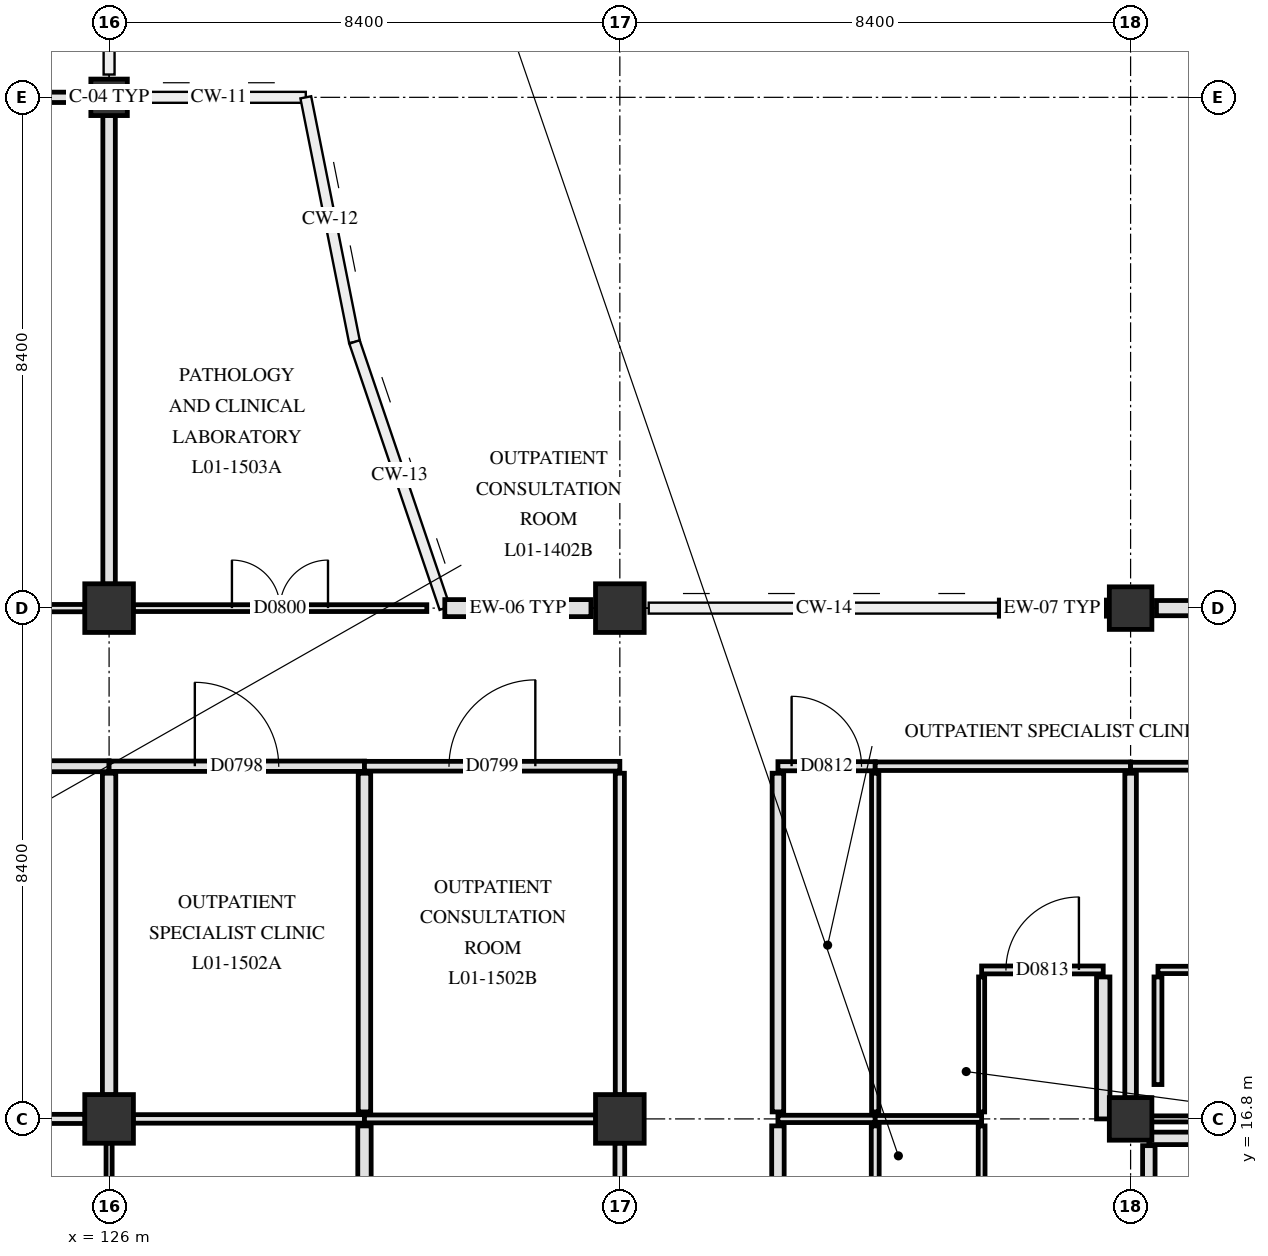
"""IFC4 building model, lengths in metres.
Left out: names, types, materials, properties, quantities, classifications, styles, units other than length and angle.
Written with IfcOpenShell. Run it as: python <this file> out.ifc"""

import sys

from ifc_helpers import new_model, si_unit, direction, frame, frame_2d, origin, origin_2d, place, context, subcontext, project, spatial, rectangle, extrude, element, fill, save


model = new_model("IFC4")
c1 = context("Model", 3, precision=1e-05, world=origin(), true_north=direction((0.0, 1.0)))
c2 = subcontext(c1, "Body", "Model", "MODEL_VIEW")
j1 = project(units=[si_unit("LENGTHUNIT", "METRE"), si_unit("PLANEANGLEUNIT", "RADIAN")], contexts=[c1])
p1 = place(None, origin())
s1 = spatial("IfcSite", under=j1, at=p1, CompositionType="ELEMENT")
p2 = place(p1, origin())
s2 = spatial("IfcBuilding", under=s1, at=p2, CompositionType="ELEMENT")
p3 = place(p2, frame((0.0, 0.0, 4.8)))
s3 = spatial("IfcBuildingStorey", under=s2, at=p3, CompositionType="ELEMENT", Elevation=4.8)
for number, where, z_axis, x_axis in (
    (1, (126.0, 16.8, 0.0), (0.0, 0.0, 1.0), (1.0, 0.0, 0.0)),
    (2, (126.0, 25.2, 0.0), (0.0, 0.0, 1.0), (1.0, 0.0, 0.0)),
):
    element("IfcColumn", number, at=place(p3, frame(where, z_axis=z_axis, x_axis=x_axis)), inside=s3, PredefinedType="COLUMN", context=c2, shape_type="SweptSolid", body=[
        extrude(rectangle(XDim=0.8, YDim=0.8, at=origin_2d()), origin(), (0.0, 0.0, 1.0), 4.5),
    ])
p4 = place(p3, frame((126.0, 33.6, 0.0), z_axis=(0.0, 0.0, 1.0), x_axis=(1.0, 0.0, 0.0)))
e3 = element("IfcColumn", 3, at=p4, inside=s3, PredefinedType="COLUMN", context=c2, shape_type="SweptSolid", body=[
    extrude(rectangle(XDim=0.6, YDim=0.6, at=origin_2d()), origin(), (0.0, 0.0, 1.0), 4.5),
])
for number, where, z_axis, x_axis in (
    (4, (134.4, 16.8, 0.0), (0.0, 0.0, 1.0), (1.0, 0.0, 0.0)),
    (5, (134.4, 25.2, 0.0), (0.0, 0.0, 1.0), (1.0, 0.0, 0.0)),
):
    element("IfcColumn", number, at=place(p3, frame(where, z_axis=z_axis, x_axis=x_axis)), inside=s3, PredefinedType="COLUMN", context=c2, shape_type="SweptSolid", body=[
        extrude(rectangle(XDim=0.8, YDim=0.8, at=origin_2d()), origin(), (0.0, 0.0, 1.0), 4.5),
    ])
for number, where, z_axis, x_axis in (
    (6, (142.8, 16.8, 0.0), (0.0, 0.0, 1.0), (1.0, 0.0, 0.0)),
    (7, (142.8, 25.2, 0.0), (0.0, 0.0, 1.0), (1.0, 0.0, 0.0)),
):
    element("IfcColumn", number, at=place(p3, frame(where, z_axis=z_axis, x_axis=x_axis)), inside=s3, PredefinedType="COLUMN", context=c2, shape_type="SweptSolid", body=[
        extrude(rectangle(XDim=0.7, YDim=0.7, at=origin_2d()), origin(), (0.0, 0.0, 1.0), 4.5),
    ])
p5 = place(p3, frame((131.521, 25.2, 0.0), z_axis=(0.0, 0.0, 1.0), x_axis=(1.0, 0.0, 0.0)))
e8 = element("IfcWall", 8, at=p5, inside=s3, PredefinedType="SOLIDWALL", context=c2, shape_type="SweptSolid", body=[
    extrude(rectangle(XDim=2.404, YDim=0.28, at=frame_2d((1.202, 0.0))), origin(), (0.0, 0.0, 1.0), 3.54),
])
p6 = place(p3, frame((140.641, 25.2, 0.0), z_axis=(0.0, 0.0, 1.0), x_axis=(1.0, 0.0, 0.0)))
e9 = element("IfcWall", 9, at=p6, inside=s3, PredefinedType="SOLIDWALL", context=c2, shape_type="SweptSolid", body=[
    extrude(rectangle(XDim=1.734, YDim=0.265, at=frame_2d((0.867, 0.0))), origin(), (0.0, 0.0, 1.0), 3.44),
])
p7 = place(p3, frame((143.225, 25.2, 0.0), z_axis=(0.0, 0.0, 1.0), x_axis=(1.0, 0.0, 0.0)))
e10 = element("IfcWall", 10, at=p7, inside=s3, PredefinedType="SOLIDWALL", context=c2, shape_type="SweptSolid", body=[
    extrude(rectangle(XDim=6.536, YDim=0.25, at=frame_2d((3.268, 0.0))), origin(), (0.0, 0.0, 1.0), 3.44),
])
p8 = place(p7, frame((0.934, 0.0, 0.85)))
e11 = element("IfcOpeningElement", 11, at=p8, cuts=e10, PredefinedType="OPENING", context=c2, shape_type="SweptSolid", body=[
    extrude(rectangle(XDim=1.4, YDim=1.66, at=frame_2d((0.7, 0.83))), frame((0.0, 0.135, 0.0), z_axis=(0.0, -1.0, 0.0), x_axis=(1.0, 0.0, 0.0)), (0.0, 0.0, 1.0), 0.27),
])
p9 = place(p7, frame((4.152, 0.0, 0.85)))
e12 = element("IfcOpeningElement", 12, at=p9, cuts=e10, PredefinedType="OPENING", context=c2, shape_type="SweptSolid", body=[
    extrude(rectangle(XDim=1.5, YDim=1.66, at=frame_2d((0.75, 0.83))), frame((0.0, 0.135, 0.0), z_axis=(0.0, -1.0, 0.0), x_axis=(1.0, 0.0, 0.0)), (0.0, 0.0, 1.0), 0.27),
])
p10 = place(p3, frame((143.1, 12.24, 0.0), z_axis=(0.0, 0.0, 1.0), x_axis=(0.0, 1.0, 0.0)))
e13 = element("IfcWall", 13, at=p10, inside=s3, PredefinedType="PARTITIONING", context=c2, shape_type="SweptSolid", body=[
    extrude(rectangle(XDim=4.12, YDim=0.205, at=frame_2d((2.06, 0.0))), origin(), (0.0, 0.0, 1.0), 3.59),
])
p11 = place(p3, frame((143.1, 16.48, 0.0), z_axis=(0.0, 0.0, 1.0), x_axis=(1.0, 0.0, 0.0)))
e14 = element("IfcWall", 14, at=p11, inside=s3, PredefinedType="PARTITIONING", context=c2, shape_type="SweptSolid", body=[
    extrude(rectangle(XDim=4.18, YDim=0.205, at=frame_2d((2.09, 0.0))), origin(), (0.0, 0.0, 1.0), 3.54),
])
p12 = place(p11, frame((1.29, 0.0, 0.0)))
e15 = element("IfcOpeningElement", 15, at=p12, cuts=e14, PredefinedType="OPENING", context=c2, shape_type="SweptSolid", body=[
    extrude(rectangle(XDim=1.6, YDim=2.25, at=frame_2d((0.8, 1.125))), frame((0.0, 0.113, 0.0), z_axis=(0.0, -1.0, 0.0), x_axis=(1.0, 0.0, 0.0)), (0.0, 0.0, 1.0), 0.225),
])
p13 = place(p3, frame((121.8, 16.8, 0.0), z_axis=(0.0, 0.0, 1.0), x_axis=(1.0, 0.0, 0.0)))
e16 = element("IfcWall", 16, at=p13, inside=s3, PredefinedType="PARTITIONING", context=c2, shape_type="SweptSolid", body=[
    extrude(rectangle(XDim=3.805, YDim=0.15, at=frame_2d((1.902, 0.0))), origin(), (0.0, 0.0, 1.0), 3.54),
])
p14 = place(p3, frame((126.395, 16.8, 0.0), z_axis=(0.0, 0.0, 1.0), x_axis=(1.0, 0.0, 0.0)))
e17 = element("IfcWall", 17, at=p14, inside=s3, PredefinedType="PARTITIONING", context=c2, shape_type="SweptSolid", body=[
    extrude(rectangle(XDim=3.805, YDim=0.14, at=frame_2d((1.902, 0.0))), origin(), (0.0, 0.0, 1.0), 3.54),
])
p15 = place(p3, frame((130.2, 16.8, 0.0), z_axis=(0.0, 0.0, 1.0), x_axis=(1.0, 0.0, 0.0)))
e18 = element("IfcWall", 18, at=p15, inside=s3, PredefinedType="PARTITIONING", context=c2, shape_type="SweptSolid", body=[
    extrude(rectangle(XDim=3.805, YDim=0.13, at=frame_2d((1.902, 0.0))), origin(), (0.0, 0.0, 1.0), 3.54),
])
p16 = place(p3, frame((137.0, 16.8, 0.0), z_axis=(0.0, 0.0, 1.0), x_axis=(1.0, 0.0, 0.0)))
e19 = element("IfcWall", 19, at=p16, inside=s3, PredefinedType="PARTITIONING", context=c2, shape_type="SweptSolid", body=[
    extrude(rectangle(XDim=1.6, YDim=0.12, at=frame_2d((0.8, 0.0))), origin(), (0.0, 0.0, 1.0), 3.54),
])
p17 = place(p3, frame((138.6, 16.8, 0.0), z_axis=(0.0, 0.0, 1.0), x_axis=(1.0, 0.0, 0.0)))
e20 = element("IfcWall", 20, at=p17, inside=s3, PredefinedType="PARTITIONING", context=c2, shape_type="SweptSolid", body=[
    extrude(rectangle(XDim=1.75, YDim=0.112, at=frame_2d((0.875, 0.0))), origin(), (0.0, 0.0, 1.0), 3.54),
])
p18 = place(p3, frame((143.145, 16.8, 0.0), z_axis=(0.0, 0.0, 1.0), x_axis=(1.0, 0.0, 0.0)))
e21 = element("IfcWall", 21, at=p18, inside=s3, PredefinedType="PARTITIONING", context=c2, shape_type="SweptSolid", body=[
    extrude(rectangle(XDim=1.085, YDim=0.1, at=frame_2d((0.542, 0.0))), origin(), (0.0, 0.0, 1.0), 3.54),
])
p19 = place(p3, frame((140.35, 19.25, 0.0), z_axis=(0.0, 0.0, 1.0), x_axis=(1.0, 0.0, 0.0)))
e22 = element("IfcWall", 22, at=p19, inside=s3, PredefinedType="PARTITIONING", context=c2, shape_type="SweptSolid", body=[
    extrude(rectangle(XDim=2.0, YDim=0.13, at=frame_2d((1.0, 0.0))), origin(), (0.0, 0.0, 1.0), 4.14),
])
p20 = place(p19, frame((0.4, 0.0, 0.0)))
e23 = element("IfcOpeningElement", 23, at=p20, cuts=e22, PredefinedType="OPENING", context=c2, shape_type="SweptSolid", body=[
    extrude(rectangle(XDim=1.2, YDim=2.15, at=frame_2d((0.6, 1.075))), frame((0.0, 0.075, 0.0), z_axis=(0.0, -1.0, 0.0), x_axis=(1.0, 0.0, 0.0)), (0.0, 0.0, 1.0), 0.15),
])
p21 = place(p3, frame((143.25, 19.25, 0.0), z_axis=(0.0, 0.0, 1.0), x_axis=(1.0, 0.0, 0.0)))
e24 = element("IfcWall", 24, at=p21, inside=s3, PredefinedType="PARTITIONING", context=c2, shape_type="SweptSolid", body=[
    extrude(rectangle(XDim=3.75, YDim=0.12, at=frame_2d((1.875, 0.0))), origin(), (0.0, 0.0, 1.0), 4.14),
])
p22 = place(p21, frame((1.365, 0.0, 0.0)))
e25 = element("IfcOpeningElement", 25, at=p22, cuts=e24, PredefinedType="OPENING", context=c2, shape_type="SweptSolid", body=[
    extrude(rectangle(XDim=1.02, YDim=2.12, at=frame_2d((0.51, 1.06))), frame((0.0, 0.07, 0.0), z_axis=(0.0, -1.0, 0.0), x_axis=(1.0, 0.0, 0.0)), (0.0, 0.0, 1.0), 0.14),
])
p23 = place(p3, frame((121.8, 22.6, 0.0), z_axis=(0.0, 0.0, 1.0), x_axis=(1.0, 0.0, 0.0)))
e26 = element("IfcWall", 26, at=p23, inside=s3, PredefinedType="PARTITIONING", context=c2, shape_type="SweptSolid", body=[
    extrude(rectangle(XDim=4.2, YDim=0.18, at=frame_2d((2.1, 0.0))), origin(), (0.0, 0.0, 1.0), 3.59),
])
p24 = place(p23, frame((1.45, 0.0, 0.0)))
e27 = element("IfcOpeningElement", 27, at=p24, cuts=e26, PredefinedType="OPENING", context=c2, shape_type="SweptSolid", body=[
    extrude(rectangle(XDim=1.3, YDim=2.2, at=frame_2d((0.65, 1.1))), frame((0.0, 0.1, 0.0), z_axis=(0.0, -1.0, 0.0), x_axis=(1.0, 0.0, 0.0)), (0.0, 0.0, 1.0), 0.2),
])
p25 = place(p3, frame((126.0, 22.6, 0.0), z_axis=(0.0, 0.0, 1.0), x_axis=(1.0, 0.0, 0.0)))
e28 = element("IfcWall", 28, at=p25, inside=s3, PredefinedType="PARTITIONING", context=c2, shape_type="SweptSolid", body=[
    extrude(rectangle(XDim=4.2, YDim=0.17, at=frame_2d((2.1, 0.0))), origin(), (0.0, 0.0, 1.0), 3.59),
])
p26 = place(p25, frame((1.41, 0.0, 0.0)))
e29 = element("IfcOpeningElement", 29, at=p26, cuts=e28, PredefinedType="OPENING", context=c2, shape_type="SweptSolid", body=[
    extrude(rectangle(XDim=1.38, YDim=2.22, at=frame_2d((0.69, 1.11))), frame((0.0, 0.095, 0.0), z_axis=(0.0, -1.0, 0.0), x_axis=(1.0, 0.0, 0.0)), (0.0, 0.0, 1.0), 0.19),
])
p27 = place(p3, frame((130.2, 22.6, 0.0), z_axis=(0.0, 0.0, 1.0), x_axis=(1.0, 0.0, 0.0)))
e30 = element("IfcWall", 30, at=p27, inside=s3, PredefinedType="PARTITIONING", context=c2, shape_type="SweptSolid", body=[
    extrude(rectangle(XDim=4.2, YDim=0.16, at=frame_2d((2.1, 0.0))), origin(), (0.0, 0.0, 1.0), 3.59),
])
p28 = place(p27, frame((1.39, 0.0, 0.0)))
e31 = element("IfcOpeningElement", 31, at=p28, cuts=e30, PredefinedType="OPENING", context=c2, shape_type="SweptSolid", body=[
    extrude(rectangle(XDim=1.42, YDim=2.22, at=frame_2d((0.71, 1.11))), frame((0.0, 0.09, 0.0), z_axis=(0.0, -1.0, 0.0), x_axis=(1.0, 0.0, 0.0)), (0.0, 0.0, 1.0), 0.18),
])
p29 = place(p3, frame((137.0, 22.6, 0.0), z_axis=(0.0, 0.0, 1.0), x_axis=(1.0, 0.0, 0.0)))
e32 = element("IfcWall", 32, at=p29, inside=s3, PredefinedType="PARTITIONING", context=c2, shape_type="SweptSolid", body=[
    extrude(rectangle(XDim=1.6, YDim=0.15, at=frame_2d((0.8, 0.0))), origin(), (0.0, 0.0, 1.0), 4.14),
])
p30 = place(p29, frame((0.225, 0.0, 0.0)))
e33 = element("IfcOpeningElement", 33, at=p30, cuts=e32, PredefinedType="OPENING", context=c2, shape_type="SweptSolid", body=[
    extrude(rectangle(XDim=1.15, YDim=2.15, at=frame_2d((0.575, 1.075))), frame((0.0, 0.085, 0.0), z_axis=(0.0, -1.0, 0.0), x_axis=(1.0, 0.0, 0.0)), (0.0, 0.0, 1.0), 0.17),
])
p31 = place(p3, frame((138.6, 22.6, 0.0), z_axis=(0.0, 0.0, 1.0), x_axis=(1.0, 0.0, 0.0)))
e34 = element("IfcWall", 34, at=p31, inside=s3, PredefinedType="PARTITIONING", context=c2, shape_type="SweptSolid", body=[
    extrude(rectangle(XDim=4.2, YDim=0.14, at=frame_2d((2.1, 0.0))), origin(), (0.0, 0.0, 1.0), 3.59),
])
p32 = place(p3, frame((142.8, 22.6, 0.0), z_axis=(0.0, 0.0, 1.0), x_axis=(1.0, 0.0, 0.0)))
e35 = element("IfcWall", 35, at=p32, inside=s3, PredefinedType="PARTITIONING", context=c2, shape_type="SweptSolid", body=[
    extrude(rectangle(XDim=4.2, YDim=0.13, at=frame_2d((2.1, 0.0))), origin(), (0.0, 0.0, 1.0), 3.59),
])
p33 = place(p3, frame((117.995, 25.2, 0.0), z_axis=(0.0, 0.0, 1.0), x_axis=(1.0, 0.0, 0.0)))
e36 = element("IfcWall", 36, at=p33, inside=s3, PredefinedType="PARTITIONING", context=c2, shape_type="SweptSolid", body=[
    extrude(rectangle(XDim=7.61, YDim=0.12, at=frame_2d((3.805, 0.0))), origin(), (0.0, 0.0, 1.0), 3.54),
])
p34 = place(p33, frame((3.065, 0.0, 0.0)))
e37 = element("IfcOpeningElement", 37, at=p34, cuts=e36, PredefinedType="OPENING", context=c2, shape_type="SweptSolid", body=[
    extrude(rectangle(XDim=1.48, YDim=2.22, at=frame_2d((0.74, 1.11))), frame((0.0, 0.07, 0.0), z_axis=(0.0, -1.0, 0.0), x_axis=(1.0, 0.0, 0.0)), (0.0, 0.0, 1.0), 0.14),
])
p35 = place(p3, frame((126.395, 25.2, 0.0), z_axis=(0.0, 0.0, 1.0), x_axis=(1.0, 0.0, 0.0)))
e38 = element("IfcWall", 38, at=p35, inside=s3, PredefinedType="PARTITIONING", context=c2, shape_type="SweptSolid", body=[
    extrude(rectangle(XDim=4.83, YDim=0.112, at=frame_2d((2.415, 0.0))), origin(), (0.0, 0.0, 1.0), 3.54),
])
p36 = place(p35, frame((1.625, 0.0, 0.0)))
e39 = element("IfcOpeningElement", 39, at=p36, cuts=e38, PredefinedType="OPENING", context=c2, shape_type="SweptSolid", body=[
    extrude(rectangle(XDim=1.58, YDim=2.22, at=frame_2d((0.79, 1.11))), frame((0.0, 0.066, 0.0), z_axis=(0.0, -1.0, 0.0), x_axis=(1.0, 0.0, 0.0)), (0.0, 0.0, 1.0), 0.132),
])
p37 = place(p3, frame((117.995, 33.6, 0.0), z_axis=(0.0, 0.0, 1.0), x_axis=(1.0, 0.0, 0.0)))
e40 = element("IfcWall", 40, at=p37, inside=s3, PredefinedType="PARTITIONING", context=c2, shape_type="SweptSolid", body=[
    extrude(rectangle(XDim=7.71, YDim=0.17, at=frame_2d((3.855, 0.0))), origin(), (0.0, 0.0, 1.0), 3.54),
])
p38 = place(p3, frame((126.0, 11.115, 0.0), z_axis=(0.0, 0.0, 1.0), x_axis=(0.0, 1.0, 0.0)))
e41 = element("IfcWall", 41, at=p38, inside=s3, PredefinedType="PARTITIONING", context=c2, shape_type="SweptSolid", body=[
    extrude(rectangle(XDim=5.29, YDim=0.1, at=frame_2d((2.645, 0.0))), origin(), (0.0, 0.0, 1.0), 3.59),
])
p39 = place(p3, frame((126.0, 17.195, 0.0), z_axis=(0.0, 0.0, 1.0), x_axis=(0.0, 1.0, 0.0)))
e42 = element("IfcWall", 42, at=p39, inside=s3, PredefinedType="PARTITIONING", context=c2, shape_type="SweptSolid", body=[
    extrude(rectangle(XDim=5.29, YDim=0.22, at=frame_2d((2.645, 0.0))), origin(), (0.0, 0.0, 1.0), 3.59),
])
p40 = place(p3, frame((126.0, 25.595, 0.0), z_axis=(0.0, 0.0, 1.0), x_axis=(0.0, 1.0, 0.0)))
e43 = element("IfcWall", 43, at=p40, inside=s3, PredefinedType="PARTITIONING", context=c2, shape_type="SweptSolid", body=[
    extrude(rectangle(XDim=7.71, YDim=0.205, at=frame_2d((3.855, 0.0))), origin(), (0.0, 0.0, 1.0), 3.59),
])
p41 = place(p3, frame((130.2, 11.115, 0.0), z_axis=(0.0, 0.0, 1.0), x_axis=(0.0, 1.0, 0.0)))
e44 = element("IfcWall", 44, at=p41, inside=s3, PredefinedType="PARTITIONING", context=c2, shape_type="SweptSolid", body=[
    extrude(rectangle(XDim=5.57, YDim=0.22, at=frame_2d((2.785, 0.0))), origin(), (0.0, 0.0, 1.0), 3.54),
])
p42 = place(p3, frame((130.2, 16.915, 0.0), z_axis=(0.0, 0.0, 1.0), x_axis=(0.0, 1.0, 0.0)))
e45 = element("IfcWall", 45, at=p42, inside=s3, PredefinedType="PARTITIONING", context=c2, shape_type="SweptSolid", body=[
    extrude(rectangle(XDim=5.57, YDim=0.205, at=frame_2d((2.785, 0.0))), origin(), (0.0, 0.0, 1.0), 3.54),
])
p43 = place(p3, frame((134.4, 11.115, 0.0), z_axis=(0.0, 0.0, 1.0), x_axis=(0.0, 1.0, 0.0)))
e46 = element("IfcWall", 46, at=p43, inside=s3, PredefinedType="PARTITIONING", context=c2, shape_type="SweptSolid", body=[
    extrude(rectangle(XDim=5.29, YDim=0.16, at=frame_2d((2.645, 0.0))), origin(), (0.0, 0.0, 1.0), 3.59),
])
p44 = place(p3, frame((134.4, 17.195, 0.0), z_axis=(0.0, 0.0, 1.0), x_axis=(0.0, 1.0, 0.0)))
e47 = element("IfcWall", 47, at=p44, inside=s3, PredefinedType="PARTITIONING", context=c2, shape_type="SweptSolid", body=[
    extrude(rectangle(XDim=5.29, YDim=0.15, at=frame_2d((2.645, 0.0))), origin(), (0.0, 0.0, 1.0), 3.59),
])
p45 = place(p3, frame((137.0, 11.115, 0.0), z_axis=(0.0, 0.0, 1.0), x_axis=(0.0, 1.0, 0.0)))
e48 = element("IfcWall", 48, at=p45, inside=s3, PredefinedType="PARTITIONING", context=c2, shape_type="SweptSolid", body=[
    extrude(rectangle(XDim=5.57, YDim=0.205, at=frame_2d((2.785, 0.0))), origin(), (0.0, 0.0, 1.0), 3.54),
])
p46 = place(p3, frame((137.0, 16.915, 0.0), z_axis=(0.0, 0.0, 1.0), x_axis=(0.0, 1.0, 0.0)))
e49 = element("IfcWall", 49, at=p46, inside=s3, PredefinedType="PARTITIONING", context=c2, shape_type="SweptSolid", body=[
    extrude(rectangle(XDim=5.57, YDim=0.19, at=frame_2d((2.785, 0.0))), origin(), (0.0, 0.0, 1.0), 3.54),
])
p47 = place(p3, frame((138.6, 11.115, 0.0), z_axis=(0.0, 0.0, 1.0), x_axis=(0.0, 1.0, 0.0)))
e50 = element("IfcWall", 50, at=p47, inside=s3, PredefinedType="PARTITIONING", context=c2, shape_type="SweptSolid", body=[
    extrude(rectangle(XDim=5.57, YDim=0.13, at=frame_2d((2.785, 0.0))), origin(), (0.0, 0.0, 1.0), 3.54),
])
p48 = place(p3, frame((138.6, 16.915, 0.0), z_axis=(0.0, 0.0, 1.0), x_axis=(0.0, 1.0, 0.0)))
e51 = element("IfcWall", 51, at=p48, inside=s3, PredefinedType="PARTITIONING", context=c2, shape_type="SweptSolid", body=[
    extrude(rectangle(XDim=5.57, YDim=0.12, at=frame_2d((2.785, 0.0))), origin(), (0.0, 0.0, 1.0), 3.54),
])
p49 = place(p3, frame((140.35, 11.115, 0.0), z_axis=(0.0, 0.0, 1.0), x_axis=(0.0, 1.0, 0.0)))
e52 = element("IfcWall", 52, at=p49, inside=s3, PredefinedType="PARTITIONING", context=c2, shape_type="SweptSolid", body=[
    extrude(rectangle(XDim=5.57, YDim=0.112, at=frame_2d((2.785, 0.0))), origin(), (0.0, 0.0, 1.0), 3.54),
])
p50 = place(p3, frame((140.35, 16.915, 0.0), z_axis=(0.0, 0.0, 1.0), x_axis=(0.0, 1.0, 0.0)))
e53 = element("IfcWall", 53, at=p50, inside=s3, PredefinedType="PARTITIONING", context=c2, shape_type="SweptSolid", body=[
    extrude(rectangle(XDim=2.22, YDim=0.1, at=frame_2d((1.11, 0.0))), origin(), (0.0, 0.0, 1.0), 3.54),
])
p51 = place(p3, frame((142.35, 16.8, 0.0), z_axis=(0.0, 0.0, 1.0), x_axis=(0.0, 1.0, 0.0)))
e54 = element("IfcWall", 54, at=p51, inside=s3, PredefinedType="PARTITIONING", context=c2, shape_type="SweptSolid", body=[
    extrude(rectangle(XDim=2.335, YDim=0.22, at=frame_2d((1.167, 0.0))), origin(), (0.0, 0.0, 1.0), 3.54),
])
p52 = place(p3, frame((142.8, 17.145, 0.0), z_axis=(0.0, 0.0, 1.0), x_axis=(0.0, 1.0, 0.0)))
e55 = element("IfcWall", 55, at=p52, inside=s3, PredefinedType="PARTITIONING", context=c2, shape_type="SweptSolid", body=[
    extrude(rectangle(XDim=5.34, YDim=0.19, at=frame_2d((2.67, 0.0))), origin(), (0.0, 0.0, 1.0), 3.59),
])
p53 = place(p3, frame((143.25, 17.365, 0.0), z_axis=(0.0, 0.0, 1.0), x_axis=(0.0, 1.0, 0.0)))
e56 = element("IfcWall", 56, at=p53, inside=s3, PredefinedType="PARTITIONING", context=c2, shape_type="SweptSolid", body=[
    extrude(rectangle(XDim=1.77, YDim=0.13, at=frame_2d((0.885, 0.0))), origin(), (0.0, 0.0, 1.0), 4.14),
])
p54 = place(p26, origin())
e57 = element("IfcDoor", 57, at=p54, inside=s3, OperationType="SINGLE_SWING_LEFT", PredefinedType="DOOR", context=c2, shape_type="SweptSolid", body=[
    extrude(rectangle(XDim=1.38, YDim=2.22, at=frame_2d((0.69, 1.11))), frame((0.0, 0.025, 0.0), z_axis=(0.0, -1.0, 0.0), x_axis=(1.0, 0.0, 0.0)), (0.0, 0.0, 1.0), 0.05),
])
fill(e29, e57)
p55 = place(p28, origin())
e58 = element("IfcDoor", 58, at=p55, inside=s3, OperationType="SINGLE_SWING_RIGHT", PredefinedType="DOOR", context=c2, shape_type="SweptSolid", body=[
    extrude(rectangle(XDim=1.42, YDim=2.22, at=frame_2d((0.71, 1.11))), frame((0.0, 0.025, 0.0), z_axis=(0.0, -1.0, 0.0), x_axis=(1.0, 0.0, 0.0)), (0.0, 0.0, 1.0), 0.05),
])
fill(e31, e58)
p56 = place(p36, origin())
e59 = element("IfcDoor", 59, at=p56, inside=s3, OperationType="DOUBLE_SWING_LEFT", PredefinedType="DOOR", context=c2, shape_type="SweptSolid", body=[
    extrude(rectangle(XDim=1.58, YDim=2.22, at=frame_2d((0.79, 1.11))), frame((0.0, 0.025, 0.0), z_axis=(0.0, -1.0, 0.0), x_axis=(1.0, 0.0, 0.0)), (0.0, 0.0, 1.0), 0.05),
])
fill(e39, e59)
p57 = place(p30, origin())
e60 = element("IfcDoor", 60, at=p57, inside=s3, OperationType="SINGLE_SWING_LEFT", PredefinedType="DOOR", context=c2, shape_type="SweptSolid", body=[
    extrude(rectangle(XDim=1.15, YDim=2.15, at=frame_2d((0.575, 1.075))), frame((0.0, 0.025, 0.0), z_axis=(0.0, -1.0, 0.0), x_axis=(1.0, 0.0, 0.0)), (0.0, 0.0, 1.0), 0.05),
])
fill(e33, e60)
p58 = place(p20, origin())
e61 = element("IfcDoor", 61, at=p58, inside=s3, OperationType="SINGLE_SWING_RIGHT", PredefinedType="DOOR", context=c2, shape_type="SweptSolid", body=[
    extrude(rectangle(XDim=1.2, YDim=2.15, at=frame_2d((0.6, 1.075))), frame((0.0, 0.025, 0.0), z_axis=(0.0, -1.0, 0.0), x_axis=(1.0, 0.0, 0.0)), (0.0, 0.0, 1.0), 0.05),
])
fill(e23, e61)
save(model, sys.argv[1])
